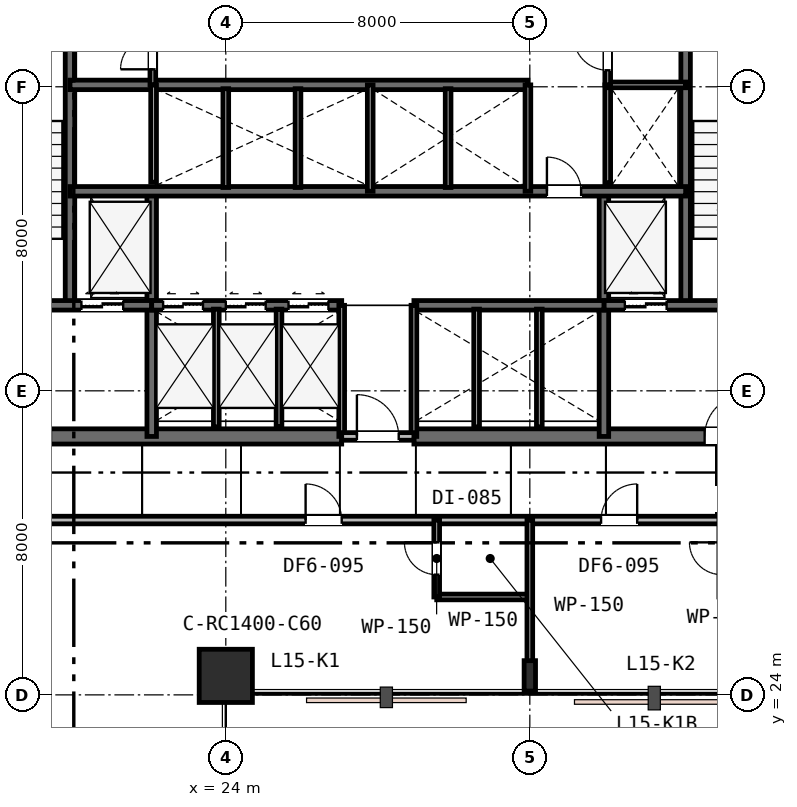
"""IFC4 building model, lengths in metres.
Left out: names, types, materials, properties, quantities, classifications, styles, units other than length and angle.
Written with IfcOpenShell. Run it as: python <this file> out.ifc"""

import sys

from ifc_helpers import new_model, si_unit, direction, frame, frame_2d, origin, origin_2d, place, context, subcontext, project, spatial, rectangle, i_section, extrude, element, fill, save


model = new_model("IFC4")
c1 = context("Model", 3, precision=1e-05, world=origin(), true_north=direction((0.0, 1.0)))
c2 = subcontext(c1, "Body", "Model", "MODEL_VIEW")
j1 = project(units=[si_unit("LENGTHUNIT", "METRE"), si_unit("PLANEANGLEUNIT", "RADIAN")], contexts=[c1])
p1 = place(None, origin())
s1 = spatial("IfcSite", under=j1, at=p1, CompositionType="ELEMENT")
p2 = place(p1, origin())
s2 = spatial("IfcBuilding", under=s1, at=p2, CompositionType="ELEMENT")
p3 = place(p2, frame((0.0, 0.0, 61.8)))
s3 = spatial("IfcBuildingStorey", under=s2, at=p3, CompositionType="ELEMENT", Elevation=61.8)
p4 = place(p3, frame((15.85, 30.8, 0.0), z_axis=(0.0, 0.0, 1.0), x_axis=(1.0, 0.0, 0.0)))
e1 = element("IfcWall", 1, at=p4, inside=s3, PredefinedType="SHEAR", context=c2, shape_type="SweptSolid", body=[
    extrude(rectangle(XDim=11.2, YDim=0.4, at=frame_2d((5.6, 0.0))), origin(), (0.0, 0.0, 1.0), 3.6),
])
p5 = place(p4, frame((2.45, 0.0, 0.0)))
e2 = element("IfcOpeningElement", 2, at=p5, cuts=e1, PredefinedType="OPENING", context=c2, shape_type="SweptSolid", body=[
    extrude(rectangle(XDim=1.1, YDim=2.15, at=frame_2d((0.55, 1.075))), frame((0.0, 0.21, 0.0), z_axis=(0.0, -1.0, 0.0), x_axis=(1.0, 0.0, 0.0)), (0.0, 0.0, 1.0), 0.42),
])
p6 = place(p3, frame((28.95, 30.8, 0.0), z_axis=(0.0, 0.0, 1.0), x_axis=(1.0, 0.0, 0.0)))
e3 = element("IfcWall", 3, at=p6, inside=s3, PredefinedType="SHEAR", context=c2, shape_type="SweptSolid", body=[
    extrude(rectangle(XDim=11.2, YDim=0.4, at=frame_2d((5.6, 0.0))), origin(), (0.0, 0.0, 1.0), 3.6),
])
p7 = place(p6, frame((7.65, 0.0, 0.0)))
e4 = element("IfcOpeningElement", 4, at=p7, cuts=e3, PredefinedType="OPENING", context=c2, shape_type="SweptSolid", body=[
    extrude(rectangle(XDim=1.1, YDim=2.15, at=frame_2d((0.55, 1.075))), frame((0.0, 0.21, 0.0), z_axis=(0.0, -1.0, 0.0), x_axis=(1.0, 0.0, 0.0)), (0.0, 0.0, 1.0), 0.42),
])
for number, where, z_axis, x_axis in (
    (5, (19.9, 34.25, 0.0), (0.0, 0.0, 1.0), (0.0, 1.0, 0.0)),
    (6, (36.1, 34.25, 0.0), (0.0, 0.0, 1.0), (0.0, 1.0, 0.0)),
):
    element("IfcWall", number, at=place(p3, frame(where, z_axis=z_axis, x_axis=x_axis)), inside=s3, PredefinedType="SHEAR", context=c2, shape_type="SweptSolid", body=[
        extrude(rectangle(XDim=8.65, YDim=0.25, at=frame_2d((4.325, 0.0))), origin(), (0.0, 0.0, 1.0), 3.6),
    ])
for number, where, z_axis, x_axis in (
    (7, (22.05, 30.8, 0.0), (0.0, 0.0, 1.0), (0.0, 1.0, 0.0)),
    (8, (33.95, 30.8, 0.0), (0.0, 0.0, 1.0), (0.0, 1.0, 0.0)),
):
    element("IfcWall", number, at=place(p3, frame(where, z_axis=z_axis, x_axis=x_axis)), inside=s3, PredefinedType="SHEAR", context=c2, shape_type="SweptSolid", body=[
        extrude(rectangle(XDim=6.45, YDim=0.25, at=frame_2d((3.225, 0.0))), origin(), (0.0, 0.0, 1.0), 3.6),
    ])
p8 = place(p3, frame((16.0, 34.25, 0.0), z_axis=(0.0, 0.0, 1.0), x_axis=(1.0, 0.0, 0.0)))
e9 = element("IfcWall", 9, at=p8, inside=s3, PredefinedType="SHEAR", context=c2, shape_type="SweptSolid", body=[
    extrude(rectangle(XDim=6.05, YDim=0.25, at=frame_2d((3.025, 0.0))), origin(), (0.0, 0.0, 1.0), 3.6),
])
p9 = place(p8, frame((1.25, 0.0, 0.0)))
e10 = element("IfcOpeningElement", 10, at=p9, cuts=e9, PredefinedType="OPENING", context=c2, shape_type="SweptSolid", body=[
    extrude(rectangle(XDim=1.0, YDim=2.15, at=frame_2d((0.5, 1.075))), frame((0.0, 0.135, 0.0), z_axis=(0.0, -1.0, 0.0), x_axis=(1.0, 0.0, 0.0)), (0.0, 0.0, 1.0), 0.27),
])
p10 = place(p8, frame((4.2, 0.0, 0.0)))
e11 = element("IfcOpeningElement", 11, at=p10, cuts=e9, PredefinedType="OPENING", context=c2, shape_type="SweptSolid", body=[
    extrude(rectangle(XDim=1.1, YDim=2.15, at=frame_2d((0.55, 1.075))), frame((0.0, 0.135, 0.0), z_axis=(0.0, -1.0, 0.0), x_axis=(1.0, 0.0, 0.0)), (0.0, 0.0, 1.0), 0.27),
])
p11 = place(p3, frame((33.95, 34.25, 0.0), z_axis=(0.0, 0.0, 1.0), x_axis=(1.0, 0.0, 0.0)))
e12 = element("IfcWall", 12, at=p11, inside=s3, PredefinedType="SHEAR", context=c2, shape_type="SweptSolid", body=[
    extrude(rectangle(XDim=6.05, YDim=0.25, at=frame_2d((3.025, 0.0))), origin(), (0.0, 0.0, 1.0), 3.6),
])
p12 = place(p11, frame((3.7, 0.0, 0.0)))
e13 = element("IfcOpeningElement", 13, at=p12, cuts=e12, PredefinedType="OPENING", context=c2, shape_type="SweptSolid", body=[
    extrude(rectangle(XDim=1.0, YDim=2.15, at=frame_2d((0.5, 1.075))), frame((0.0, 0.135, 0.0), z_axis=(0.0, -1.0, 0.0), x_axis=(1.0, 0.0, 0.0)), (0.0, 0.0, 1.0), 0.27),
])
p13 = place(p11, frame((0.55, 0.0, 0.0)))
e14 = element("IfcOpeningElement", 14, at=p13, cuts=e12, PredefinedType="OPENING", context=c2, shape_type="SweptSolid", body=[
    extrude(rectangle(XDim=1.1, YDim=2.15, at=frame_2d((0.55, 1.075))), frame((0.0, 0.135, 0.0), z_axis=(0.0, -1.0, 0.0), x_axis=(1.0, 0.0, 0.0)), (0.0, 0.0, 1.0), 0.27),
])
p14 = place(p3, frame((22.05, 34.25, 0.0), z_axis=(0.0, 0.0, 1.0), x_axis=(1.0, 0.0, 0.0)))
e15 = element("IfcWall", 15, at=p14, inside=s3, PredefinedType="SHEAR", context=c2, shape_type="SweptSolid", body=[
    extrude(rectangle(XDim=5.0, YDim=0.25, at=frame_2d((2.5, 0.0))), origin(), (0.0, 0.0, 1.0), 3.6),
])
p15 = place(p14, frame((0.3, 0.0, 0.0)))
e16 = element("IfcOpeningElement", 16, at=p15, cuts=e15, PredefinedType="OPENING", context=c2, shape_type="SweptSolid", body=[
    extrude(rectangle(XDim=1.05, YDim=2.15, at=frame_2d((0.525, 1.075))), frame((0.0, 0.135, 0.0), z_axis=(0.0, -1.0, 0.0), x_axis=(1.0, 0.0, 0.0)), (0.0, 0.0, 1.0), 0.27),
])
p16 = place(p14, frame((1.95, 0.0, 0.0)))
e17 = element("IfcOpeningElement", 17, at=p16, cuts=e15, PredefinedType="OPENING", context=c2, shape_type="SweptSolid", body=[
    extrude(rectangle(XDim=1.05, YDim=2.15, at=frame_2d((0.525, 1.075))), frame((0.0, 0.135, 0.0), z_axis=(0.0, -1.0, 0.0), x_axis=(1.0, 0.0, 0.0)), (0.0, 0.0, 1.0), 0.27),
])
p17 = place(p14, frame((3.6, 0.0, 0.0)))
e18 = element("IfcOpeningElement", 18, at=p17, cuts=e15, PredefinedType="OPENING", context=c2, shape_type="SweptSolid", body=[
    extrude(rectangle(XDim=1.05, YDim=2.15, at=frame_2d((0.525, 1.075))), frame((0.0, 0.135, 0.0), z_axis=(0.0, -1.0, 0.0), x_axis=(1.0, 0.0, 0.0)), (0.0, 0.0, 1.0), 0.27),
])
p18 = place(p3, frame((28.95, 34.25, 0.0), z_axis=(0.0, 0.0, 1.0), x_axis=(1.0, 0.0, 0.0)))
e19 = element("IfcWall", 19, at=p18, inside=s3, PredefinedType="SHEAR", context=c2, shape_type="SweptSolid", body=[
    extrude(rectangle(XDim=5.0, YDim=0.25, at=frame_2d((2.5, 0.0))), origin(), (0.0, 0.0, 1.0), 3.6),
])
p19 = place(p3, frame((19.9, 37.25, 0.0), z_axis=(0.0, 0.0, 1.0), x_axis=(1.0, 0.0, 0.0)))
e20 = element("IfcWall", 20, at=p19, inside=s3, PredefinedType="SHEAR", context=c2, shape_type="SweptSolid", body=[
    extrude(rectangle(XDim=16.2, YDim=0.25, at=frame_2d((8.1, 0.0))), origin(), (0.0, 0.0, 1.0), 3.6),
])
p20 = place(p19, frame((12.55, 0.0, 0.0)))
e21 = element("IfcOpeningElement", 21, at=p20, cuts=e20, PredefinedType="OPENING", context=c2, shape_type="SweptSolid", body=[
    extrude(rectangle(XDim=0.9, YDim=2.15, at=frame_2d((0.45, 1.075))), frame((0.0, 0.135, 0.0), z_axis=(0.0, -1.0, 0.0), x_axis=(1.0, 0.0, 0.0)), (0.0, 0.0, 1.0), 0.27),
])
p21 = place(p3, frame((19.9, 40.05, 0.0), z_axis=(0.0, 0.0, 1.0), x_axis=(1.0, 0.0, 0.0)))
e22 = element("IfcWall", 22, at=p21, inside=s3, PredefinedType="SHEAR", context=c2, shape_type="SweptSolid", body=[
    extrude(rectangle(XDim=12.05, YDim=0.25, at=frame_2d((6.025, 0.0))), origin(), (0.0, 0.0, 1.0), 3.6),
])
p22 = place(p3, frame((24.0, 24.5, 0.0), z_axis=(0.0, 0.0, 1.0), x_axis=(1.0, 0.0, 0.0)))
e23 = element("IfcColumn", 23, at=p22, inside=s3, PredefinedType="COLUMN", context=c2, shape_type="SweptSolid", body=[
    extrude(rectangle(XDim=1.4, YDim=1.4, at=origin_2d()), origin(), (0.0, 0.0, 1.0), 3.6),
])
p23 = place(p3, frame((32.0, 24.5, 0.0), z_axis=(0.0, 0.0, 1.0), x_axis=(1.0, 0.0, 0.0)))
e24 = element("IfcColumn", 24, at=p23, inside=s3, PredefinedType="COLUMN", context=c2, shape_type="SweptSolid", body=[
    extrude(i_section(OverallWidth=0.3, OverallDepth=0.8, WebThickness=0.018, FlangeThickness=0.033, FilletRadius=0.03, at=origin_2d()), origin(), (0.0, 0.0, 1.0), 3.6),
])
for number, where, z_axis, x_axis in (
    (25, (27.05, 30.8, 0.0), (0.0, 0.0, 1.0), (0.0, 1.0, 0.0)),
    (26, (28.95, 30.8, 0.0), (0.0, 0.0, 1.0), (0.0, 1.0, 0.0)),
):
    element("IfcWall", number, at=place(p3, frame(where, z_axis=z_axis, x_axis=x_axis)), inside=s3, PredefinedType="PLUMBINGWALL", context=c2, shape_type="SweptSolid", body=[
        extrude(rectangle(XDim=3.45, YDim=0.15, at=frame_2d((1.725, 0.0))), origin(), (0.0, 0.0, 1.0), 3.33),
    ])
p24 = place(p3, frame((27.05, 30.8, 0.0), z_axis=(0.0, 0.0, 1.0), x_axis=(1.0, 0.0, 0.0)))
e27 = element("IfcWall", 27, at=p24, inside=s3, PredefinedType="PARTITIONING", context=c2, shape_type="SweptSolid", body=[
    extrude(rectangle(XDim=1.9, YDim=0.2, at=frame_2d((0.95, 0.0))), origin(), (0.0, 0.0, 1.0), 3.33),
])
p25 = place(p24, frame((0.4, 0.0, 0.0)))
e28 = element("IfcOpeningElement", 28, at=p25, cuts=e27, PredefinedType="OPENING", context=c2, shape_type="SweptSolid", body=[
    extrude(rectangle(XDim=1.1, YDim=2.15, at=frame_2d((0.55, 1.075))), frame((0.0, 0.11, 0.0), z_axis=(0.0, -1.0, 0.0), x_axis=(1.0, 0.0, 0.0)), (0.0, 0.0, 1.0), 0.22),
])
for number, where, z_axis, x_axis in (
    (29, (23.75, 31.05, 0.0), (0.0, 0.0, 1.0), (0.0, 1.0, 0.0)),
    (30, (25.4, 31.05, 0.0), (0.0, 0.0, 1.0), (0.0, 1.0, 0.0)),
    (31, (30.6, 31.05, 0.0), (0.0, 0.0, 1.0), (0.0, 1.0, 0.0)),
    (32, (32.25, 31.05, 0.0), (0.0, 0.0, 1.0), (0.0, 1.0, 0.0)),
):
    element("IfcWall", number, at=place(p3, frame(where, z_axis=z_axis, x_axis=x_axis)), inside=s3, PredefinedType="PLUMBINGWALL", context=c2, shape_type="SweptSolid", body=[
        extrude(rectangle(XDim=3.1, YDim=0.15, at=frame_2d((1.55, 0.0))), origin(), (0.0, 0.0, 1.0), 3.33),
    ])
p26 = place(p3, frame((22.1, 37.49, 0.0), z_axis=(0.0, 0.0, 1.0), x_axis=(0.0, 1.0, 0.0)))
e33 = element("IfcWall", 33, at=p26, inside=s3, PredefinedType="PLUMBINGWALL", context=c2, shape_type="SweptSolid", body=[
    extrude(rectangle(XDim=2.56, YDim=0.15, at=frame_2d((1.28, 0.0))), origin(), (0.0, 0.0, 1.0), 3.33),
])
p27 = place(p3, frame((27.8, 37.25, 0.0), z_axis=(0.0, 0.0, 1.0), x_axis=(0.0, 1.0, 0.0)))
e34 = element("IfcWall", 34, at=p27, inside=s3, PredefinedType="PLUMBINGWALL", context=c2, shape_type="SweptSolid", body=[
    extrude(rectangle(XDim=2.8, YDim=0.15, at=frame_2d((1.4, 0.0))), origin(), (0.0, 0.0, 1.0), 3.33),
])
for number, where, z_axis, x_axis in (
    (35, (24.0, 37.35, 0.0), (0.0, 0.0, 1.0), (0.0, 1.0, 0.0)),
    (36, (25.9, 37.35, 0.0), (0.0, 0.0, 1.0), (0.0, 1.0, 0.0)),
):
    element("IfcWall", number, at=place(p3, frame(where, z_axis=z_axis, x_axis=x_axis)), inside=s3, PredefinedType="PLUMBINGWALL", context=c2, shape_type="SweptSolid", body=[
        extrude(rectangle(XDim=2.6, YDim=0.15, at=frame_2d((1.3, 0.0))), origin(), (0.0, 0.0, 1.0), 3.33),
    ])
p28 = place(p3, frame((31.95, 37.25, 0.0), z_axis=(0.0, 0.0, 1.0), x_axis=(0.0, 1.0, 0.0)))
e37 = element("IfcWall", 37, at=p28, inside=s3, PredefinedType="PLUMBINGWALL", context=c2, shape_type="SweptSolid", body=[
    extrude(rectangle(XDim=2.8, YDim=0.15, at=frame_2d((1.4, 0.0))), origin(), (0.0, 0.0, 1.0), 3.33),
])
p29 = place(p3, frame((29.85, 37.35, 0.0), z_axis=(0.0, 0.0, 1.0), x_axis=(0.0, 1.0, 0.0)))
e38 = element("IfcWall", 38, at=p29, inside=s3, PredefinedType="PLUMBINGWALL", context=c2, shape_type="SweptSolid", body=[
    extrude(rectangle(XDim=2.6, YDim=0.15, at=frame_2d((1.3, 0.0))), origin(), (0.0, 0.0, 1.0), 3.33),
])
p30 = place(p3, frame((34.05, 37.473, 0.0), z_axis=(0.0, 0.0, 1.0), x_axis=(0.0, 1.0, 0.0)))
e39 = element("IfcWall", 39, at=p30, inside=s3, PredefinedType="PLUMBINGWALL", context=c2, shape_type="SweptSolid", body=[
    extrude(rectangle(XDim=2.577, YDim=0.15, at=frame_2d((1.288, 0.0))), origin(), (0.0, 0.0, 1.0), 3.33),
])
p31 = place(p3, frame((34.05, 40.05, 0.0), z_axis=(0.0, 0.0, 1.0), x_axis=(1.0, 0.0, 0.0)))
e40 = element("IfcWall", 40, at=p31, inside=s3, PredefinedType="PARTITIONING", context=c2, shape_type="SweptSolid", body=[
    extrude(rectangle(XDim=2.05, YDim=0.15, at=frame_2d((1.025, 0.0))), origin(), (0.0, 0.0, 1.0), 3.33),
])
p32 = place(p3, frame((34.05, 40.05, 0.0), z_axis=(0.0, 0.0, 1.0), x_axis=(0.0, 1.0, 0.0)))
e41 = element("IfcWall", 41, at=p32, inside=s3, PredefinedType="PARTITIONING", context=c2, shape_type="SweptSolid", body=[
    extrude(rectangle(XDim=2.63, YDim=0.15, at=frame_2d((1.315, 0.0))), origin(), (0.0, 0.0, 1.0), 3.33),
])
p33 = place(p32, frame((0.385, 0.0, 0.0)))
e42 = element("IfcOpeningElement", 42, at=p33, cuts=e41, PredefinedType="OPENING", context=c2, shape_type="SweptSolid", body=[
    extrude(rectangle(XDim=0.9, YDim=2.15, at=frame_2d((0.45, 1.075))), frame((0.0, 0.085, 0.0), z_axis=(0.0, -1.0, 0.0), x_axis=(1.0, 0.0, 0.0)), (0.0, 0.0, 1.0), 0.17),
])
p34 = place(p3, frame((22.08, 40.05, 0.0), z_axis=(0.0, 0.0, 1.0), x_axis=(0.0, 1.0, 0.0)))
e43 = element("IfcWall", 43, at=p34, inside=s3, PredefinedType="PARTITIONING", context=c2, shape_type="SweptSolid", body=[
    extrude(rectangle(XDim=2.63, YDim=0.15, at=frame_2d((1.315, 0.0))), origin(), (0.0, 0.0, 1.0), 3.33),
])
p35 = place(p34, frame((0.41, 0.0, 0.0)))
e44 = element("IfcOpeningElement", 44, at=p35, cuts=e43, PredefinedType="OPENING", context=c2, shape_type="SweptSolid", body=[
    extrude(rectangle(XDim=0.85, YDim=2.15, at=frame_2d((0.425, 1.075))), frame((0.0, 0.085, 0.0), z_axis=(0.0, -1.0, 0.0), x_axis=(1.0, 0.0, 0.0)), (0.0, 0.0, 1.0), 0.17),
])
p36 = place(p3, frame((11.8, 28.6, 0.0), z_axis=(0.0, 0.0, 1.0), x_axis=(1.0, 0.0, 0.0)))
e45 = element("IfcWall", 45, at=p36, inside=s3, PredefinedType="PARTITIONING", context=c2, shape_type="SweptSolid", body=[
    extrude(rectangle(XDim=38.6, YDim=0.2, at=frame_2d((19.3, 0.0))), origin(), (0.0, 0.0, 1.0), 2.82),
])
p37 = place(p36, frame((14.3, 0.0, 0.0)))
e46 = element("IfcOpeningElement", 46, at=p37, cuts=e45, PredefinedType="OPENING", context=c2, shape_type="SweptSolid", body=[
    extrude(rectangle(XDim=0.95, YDim=2.15, at=frame_2d((0.475, 1.075))), frame((0.0, 0.11, 0.0), z_axis=(0.0, -1.0, 0.0), x_axis=(1.0, 0.0, 0.0)), (0.0, 0.0, 1.0), 0.22),
])
p38 = place(p36, frame((22.075, 0.0, 0.0)))
e47 = element("IfcOpeningElement", 47, at=p38, cuts=e45, PredefinedType="OPENING", context=c2, shape_type="SweptSolid", body=[
    extrude(rectangle(XDim=0.95, YDim=2.15, at=frame_2d((0.475, 1.075))), frame((0.0, 0.11, 0.0), z_axis=(0.0, -1.0, 0.0), x_axis=(1.0, 0.0, 0.0)), (0.0, 0.0, 1.0), 0.22),
])
p39 = place(p36, frame((28.829, 0.0, 0.0)))
e48 = element("IfcOpeningElement", 48, at=p39, cuts=e45, PredefinedType="OPENING", context=c2, shape_type="SweptSolid", body=[
    extrude(rectangle(XDim=0.95, YDim=2.15, at=frame_2d((0.475, 1.075))), frame((0.0, 0.11, 0.0), z_axis=(0.0, -1.0, 0.0), x_axis=(1.0, 0.0, 0.0)), (0.0, 0.0, 1.0), 0.22),
])
p40 = place(p36, frame((34.669, 0.0, 0.0)))
e49 = element("IfcOpeningElement", 49, at=p40, cuts=e45, PredefinedType="OPENING", context=c2, shape_type="SweptSolid", body=[
    extrude(rectangle(XDim=0.95, YDim=2.15, at=frame_2d((0.475, 1.075))), frame((0.0, 0.11, 0.0), z_axis=(0.0, -1.0, 0.0), x_axis=(1.0, 0.0, 0.0)), (0.0, 0.0, 1.0), 0.22),
])
p41 = place(p3, frame((29.55, 26.576, 0.0), z_axis=(0.0, 0.0, 1.0), x_axis=(1.0, 0.0, 0.0)))
e50 = element("IfcWall", 50, at=p41, inside=s3, PredefinedType="PARTITIONING", context=c2, shape_type="SweptSolid", body=[
    extrude(rectangle(XDim=2.45, YDim=0.15, at=frame_2d((1.225, 0.0))), origin(), (0.0, 0.0, 1.0), 3.33),
])
p42 = place(p3, frame((29.55, 26.576, 0.0), z_axis=(0.0, 0.0, 1.0), x_axis=(0.0, 1.0, 0.0)))
e51 = element("IfcWall", 51, at=p42, inside=s3, PredefinedType="PARTITIONING", context=c2, shape_type="SweptSolid", body=[
    extrude(rectangle(XDim=2.024, YDim=0.15, at=frame_2d((1.012, 0.0))), origin(), (0.0, 0.0, 1.0), 3.33),
])
p43 = place(p42, frame((0.587, 0.0, 0.0)))
e52 = element("IfcOpeningElement", 52, at=p43, cuts=e51, PredefinedType="OPENING", context=c2, shape_type="SweptSolid", body=[
    extrude(rectangle(XDim=0.85, YDim=2.15, at=frame_2d((0.425, 1.075))), frame((0.0, 0.085, 0.0), z_axis=(0.0, -1.0, 0.0), x_axis=(1.0, 0.0, 0.0)), (0.0, 0.0, 1.0), 0.17),
])
p44 = place(p3, frame((32.0, 28.6, 0.0), z_axis=(0.0, 0.0, 1.0), x_axis=(0.0, -1.0, 0.0)))
e53 = element("IfcWall", 53, at=p44, inside=s3, PredefinedType="PARTITIONING", context=c2, shape_type="SweptSolid", body=[
    extrude(rectangle(XDim=4.5, YDim=0.15, at=frame_2d((2.25, 0.0))), origin(), (0.0, 0.0, 1.0), 2.93),
])
p45 = place(p25, origin())
e54 = element("IfcDoor", 54, at=p45, inside=s3, OperationType="SINGLE_SWING_LEFT", PredefinedType="DOOR", context=c2, shape_type="SweptSolid", body=[
    extrude(rectangle(XDim=1.1, YDim=2.15, at=frame_2d((0.55, 1.075))), frame((0.0, 0.025, 0.0), z_axis=(0.0, -1.0, 0.0), x_axis=(1.0, 0.0, 0.0)), (0.0, 0.0, 1.0), 0.05),
])
fill(e28, e54)
p46 = place(p7, origin())
e55 = element("IfcDoor", 55, at=p46, inside=s3, OperationType="SINGLE_SWING_RIGHT", PredefinedType="DOOR", context=c2, shape_type="SweptSolid", body=[
    extrude(rectangle(XDim=1.1, YDim=2.15, at=frame_2d((0.55, 1.075))), frame((0.0, 0.025, 0.0), z_axis=(0.0, -1.0, 0.0), x_axis=(1.0, 0.0, 0.0)), (0.0, 0.0, 1.0), 0.05),
])
fill(e4, e55)
p47 = place(p20, origin())
e56 = element("IfcDoor", 56, at=p47, inside=s3, OperationType="SINGLE_SWING_LEFT", PredefinedType="DOOR", context=c2, shape_type="SweptSolid", body=[
    extrude(rectangle(XDim=0.9, YDim=2.15, at=frame_2d((0.45, 1.075))), frame((0.0, 0.025, 0.0), z_axis=(0.0, -1.0, 0.0), x_axis=(1.0, 0.0, 0.0)), (0.0, 0.0, 1.0), 0.05),
])
fill(e21, e56)
p48 = place(p33, origin())
e57 = element("IfcDoor", 57, at=p48, inside=s3, OperationType="SINGLE_SWING_RIGHT", PredefinedType="DOOR", context=c2, shape_type="SweptSolid", body=[
    extrude(rectangle(XDim=0.9, YDim=2.15, at=frame_2d((0.45, 1.075))), frame((0.0, 0.025, 0.0), z_axis=(0.0, -1.0, 0.0), x_axis=(1.0, 0.0, 0.0)), (0.0, 0.0, 1.0), 0.05),
])
fill(e42, e57)
p49 = place(p35, origin())
e58 = element("IfcDoor", 58, at=p49, inside=s3, OperationType="SINGLE_SWING_LEFT", PredefinedType="DOOR", context=c2, shape_type="SweptSolid", body=[
    extrude(rectangle(XDim=0.85, YDim=2.15, at=frame_2d((0.425, 1.075))), frame((0.0, 0.025, 0.0), z_axis=(0.0, -1.0, 0.0), x_axis=(1.0, 0.0, 0.0)), (0.0, 0.0, 1.0), 0.05),
])
fill(e44, e58)
p50 = place(p37, origin())
e59 = element("IfcDoor", 59, at=p50, inside=s3, OperationType="SINGLE_SWING_LEFT", PredefinedType="DOOR", context=c2, shape_type="SweptSolid", body=[
    extrude(rectangle(XDim=0.95, YDim=2.15, at=frame_2d((0.475, 1.075))), frame((0.0, 0.025, 0.0), z_axis=(0.0, -1.0, 0.0), x_axis=(1.0, 0.0, 0.0)), (0.0, 0.0, 1.0), 0.05),
])
fill(e46, e59)
p51 = place(p43, origin())
e60 = element("IfcDoor", 60, at=p51, inside=s3, OperationType="SINGLE_SWING_RIGHT", PredefinedType="DOOR", context=c2, shape_type="SweptSolid", body=[
    extrude(rectangle(XDim=0.85, YDim=2.15, at=frame_2d((0.425, 1.075))), frame((0.0, 0.025, 0.0), z_axis=(0.0, -1.0, 0.0), x_axis=(1.0, 0.0, 0.0)), (0.0, 0.0, 1.0), 0.05),
])
fill(e52, e60)
p52 = place(p38, origin())
e61 = element("IfcDoor", 61, at=p52, inside=s3, OperationType="SINGLE_SWING_RIGHT", PredefinedType="DOOR", context=c2, shape_type="SweptSolid", body=[
    extrude(rectangle(XDim=0.95, YDim=2.15, at=frame_2d((0.475, 1.075))), frame((0.0, 0.025, 0.0), z_axis=(0.0, -1.0, 0.0), x_axis=(1.0, 0.0, 0.0)), (0.0, 0.0, 1.0), 0.05),
])
fill(e47, e61)
p53 = place(p10, origin())
e62 = element("IfcDoor", 62, at=p53, inside=s3, OperationType="DOUBLE_DOOR_SLIDING", PredefinedType="DOOR", context=c2, shape_type="SweptSolid", body=[
    extrude(rectangle(XDim=1.1, YDim=2.15, at=frame_2d((0.55, 1.075))), frame((0.0, 0.025, 0.0), z_axis=(0.0, -1.0, 0.0), x_axis=(1.0, 0.0, 0.0)), (0.0, 0.0, 1.0), 0.05),
])
fill(e11, e62)
p54 = place(p13, origin())
e63 = element("IfcDoor", 63, at=p54, inside=s3, OperationType="DOUBLE_DOOR_SLIDING", PredefinedType="DOOR", context=c2, shape_type="SweptSolid", body=[
    extrude(rectangle(XDim=1.1, YDim=2.15, at=frame_2d((0.55, 1.075))), frame((0.0, 0.025, 0.0), z_axis=(0.0, -1.0, 0.0), x_axis=(1.0, 0.0, 0.0)), (0.0, 0.0, 1.0), 0.05),
])
fill(e14, e63)
p55 = place(p15, origin())
e64 = element("IfcDoor", 64, at=p55, inside=s3, OperationType="DOUBLE_DOOR_SLIDING", PredefinedType="DOOR", context=c2, shape_type="SweptSolid", body=[
    extrude(rectangle(XDim=1.05, YDim=2.15, at=frame_2d((0.525, 1.075))), frame((0.0, 0.025, 0.0), z_axis=(0.0, -1.0, 0.0), x_axis=(1.0, 0.0, 0.0)), (0.0, 0.0, 1.0), 0.05),
])
fill(e16, e64)
p56 = place(p16, origin())
e65 = element("IfcDoor", 65, at=p56, inside=s3, OperationType="DOUBLE_DOOR_SLIDING", PredefinedType="DOOR", context=c2, shape_type="SweptSolid", body=[
    extrude(rectangle(XDim=1.05, YDim=2.15, at=frame_2d((0.525, 1.075))), frame((0.0, 0.025, 0.0), z_axis=(0.0, -1.0, 0.0), x_axis=(1.0, 0.0, 0.0)), (0.0, 0.0, 1.0), 0.05),
])
fill(e17, e65)
p57 = place(p17, origin())
e66 = element("IfcDoor", 66, at=p57, inside=s3, OperationType="DOUBLE_DOOR_SLIDING", PredefinedType="DOOR", context=c2, shape_type="SweptSolid", body=[
    extrude(rectangle(XDim=1.05, YDim=2.15, at=frame_2d((0.525, 1.075))), frame((0.0, 0.025, 0.0), z_axis=(0.0, -1.0, 0.0), x_axis=(1.0, 0.0, 0.0)), (0.0, 0.0, 1.0), 0.05),
])
fill(e18, e66)
save(model, sys.argv[1])
